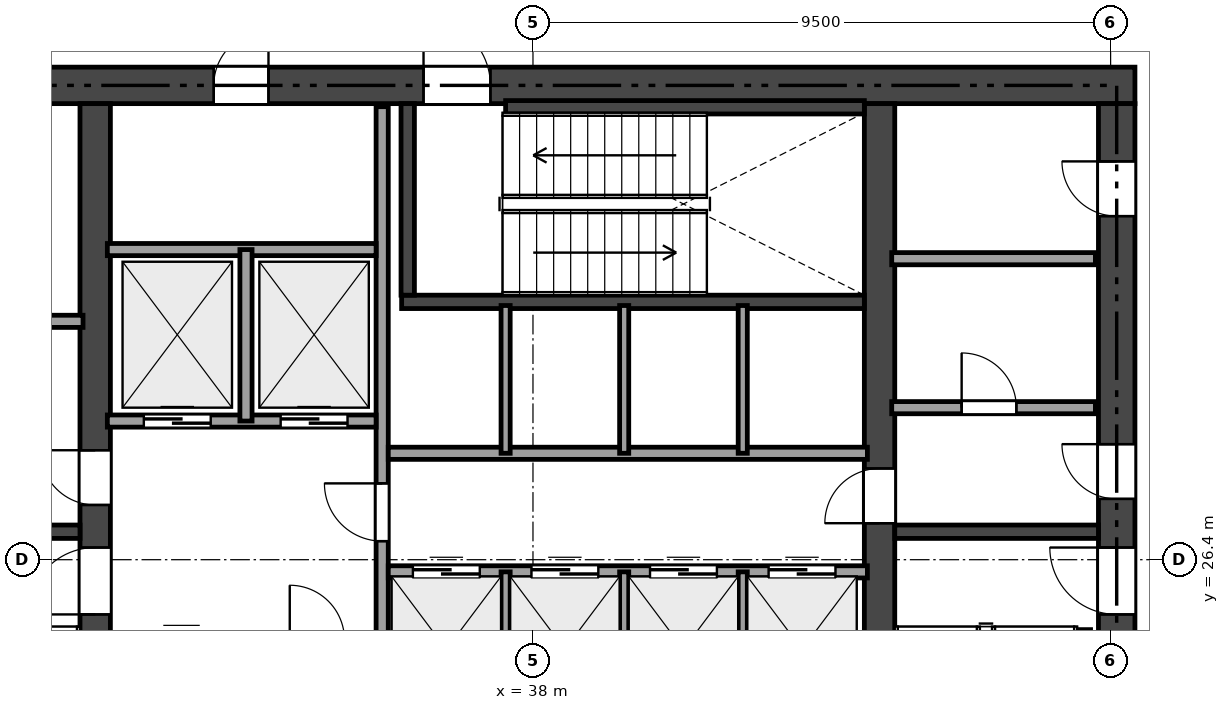
"""IFC4 building model, lengths in metres.
Left out: names, types, materials, properties, quantities, classifications, styles, units other than length and angle.
Written with IfcOpenShell. Run it as: python <this file> out.ifc"""

import sys

from ifc_helpers import new_model, si_unit, direction, frame, frame_2d, origin, place, context, subcontext, project, spatial, rectangle, extrude, element, fill, save


model = new_model("IFC4")
c1 = context("Model", 3, precision=1e-05, world=origin(), true_north=direction((0.0, 1.0)))
c2 = subcontext(c1, "Body", "Model", "MODEL_VIEW")
j1 = project(units=[si_unit("LENGTHUNIT", "METRE"), si_unit("PLANEANGLEUNIT", "RADIAN")], contexts=[c1])
p1 = place(None, origin())
s1 = spatial("IfcSite", under=j1, at=p1, CompositionType="ELEMENT")
p2 = place(p1, origin())
s2 = spatial("IfcBuilding", under=s1, at=p2, CompositionType="ELEMENT")
p3 = place(p2, frame((0.0, 0.0, 172.5)))
s3 = spatial("IfcBuildingStorey", under=s2, at=p3, CompositionType="ELEMENT", Elevation=172.5)
p4 = place(p3, frame((26.5, 34.2, 0.0), z_axis=(0.0, 0.0, 1.0), x_axis=(1.0, 0.0, 0.0)))
e1 = element("IfcWall", 1, at=p4, inside=s3, PredefinedType="SHEAR", context=c2, shape_type="SweptSolid", body=[
    extrude(rectangle(XDim=21.4, YDim=0.6, at=frame_2d((10.7, 0.0))), origin(), (0.0, 0.0, 1.0), 4.08),
])
p5 = place(p4, frame((9.7, 0.0, 0.0)))
e2 = element("IfcOpeningElement", 2, at=p5, cuts=e1, PredefinedType="OPENING", context=c2, shape_type="SweptSolid", body=[
    extrude(rectangle(XDim=1.1, YDim=2.15, at=frame_2d((0.55, 1.075))), frame((0.0, 0.31, 0.0), z_axis=(0.0, -1.0, 0.0), x_axis=(1.0, 0.0, 0.0)), (0.0, 0.0, 1.0), 0.62),
])
p6 = place(p4, frame((1.95, 0.0, 0.0)))
e3 = element("IfcOpeningElement", 3, at=p6, cuts=e1, PredefinedType="OPENING", context=c2, shape_type="SweptSolid", body=[
    extrude(rectangle(XDim=0.9, YDim=2.1, at=frame_2d((0.45, 1.05))), frame((0.0, 0.31, 0.0), z_axis=(0.0, -1.0, 0.0), x_axis=(1.0, 0.0, 0.0)), (0.0, 0.0, 1.0), 0.62),
])
p7 = place(p4, frame((6.25, 0.0, 0.0)))
e4 = element("IfcOpeningElement", 4, at=p7, cuts=e1, PredefinedType="OPENING", context=c2, shape_type="SweptSolid", body=[
    extrude(rectangle(XDim=0.9, YDim=2.1, at=frame_2d((0.45, 1.05))), frame((0.0, 0.31, 0.0), z_axis=(0.0, -1.0, 0.0), x_axis=(1.0, 0.0, 0.0)), (0.0, 0.0, 1.0), 0.62),
])
p8 = place(p3, frame((47.6, 18.9, 0.0), z_axis=(0.0, 0.0, 1.0), x_axis=(0.0, 1.0, 0.0)))
e5 = element("IfcWall", 5, at=p8, inside=s3, PredefinedType="SHEAR", context=c2, shape_type="SweptSolid", body=[
    extrude(rectangle(XDim=15.0, YDim=0.6, at=frame_2d((7.5, 0.0))), origin(), (0.0, 0.0, 1.0), 4.08),
])
p9 = place(p8, frame((6.6, 0.0, 0.0)))
e6 = element("IfcOpeningElement", 6, at=p9, cuts=e5, PredefinedType="OPENING", context=c2, shape_type="SweptSolid", body=[
    extrude(rectangle(XDim=1.1, YDim=2.15, at=frame_2d((0.55, 1.075))), frame((0.0, 0.31, 0.0), z_axis=(0.0, -1.0, 0.0), x_axis=(1.0, 0.0, 0.0)), (0.0, 0.0, 1.0), 0.62),
])
p10 = place(p8, frame((8.5, 0.0, 0.0)))
e7 = element("IfcOpeningElement", 7, at=p10, cuts=e5, PredefinedType="OPENING", context=c2, shape_type="SweptSolid", body=[
    extrude(rectangle(XDim=0.9, YDim=2.1, at=frame_2d((0.45, 1.05))), frame((0.0, 0.31, 0.0), z_axis=(0.0, -1.0, 0.0), x_axis=(1.0, 0.0, 0.0)), (0.0, 0.0, 1.0), 0.62),
])
p11 = place(p8, frame((13.15, 0.0, 0.0)))
e8 = element("IfcOpeningElement", 8, at=p11, cuts=e5, PredefinedType="OPENING", context=c2, shape_type="SweptSolid", body=[
    extrude(rectangle(XDim=0.9, YDim=2.1, at=frame_2d((0.45, 1.05))), frame((0.0, 0.31, 0.0), z_axis=(0.0, -1.0, 0.0), x_axis=(1.0, 0.0, 0.0)), (0.0, 0.0, 1.0), 0.62),
])
p12 = place(p3, frame((30.8, 18.9, 0.0), z_axis=(0.0, 0.0, 1.0), x_axis=(0.0, 1.0, 0.0)))
e9 = element("IfcWall", 9, at=p12, inside=s3, PredefinedType="SHEAR", context=c2, shape_type="SweptSolid", body=[
    extrude(rectangle(XDim=15.0, YDim=0.5, at=frame_2d((7.5, 0.0))), origin(), (0.0, 0.0, 1.0), 4.08),
])
p13 = place(p12, frame((6.6, 0.0, 0.0)))
e10 = element("IfcOpeningElement", 10, at=p13, cuts=e9, PredefinedType="OPENING", context=c2, shape_type="SweptSolid", body=[
    extrude(rectangle(XDim=1.1, YDim=2.15, at=frame_2d((0.55, 1.075))), frame((0.0, 0.26, 0.0), z_axis=(0.0, -1.0, 0.0), x_axis=(1.0, 0.0, 0.0)), (0.0, 0.0, 1.0), 0.52),
])
p14 = place(p12, frame((8.4, 0.0, 0.0)))
e11 = element("IfcOpeningElement", 11, at=p14, cuts=e9, PredefinedType="OPENING", context=c2, shape_type="SweptSolid", body=[
    extrude(rectangle(XDim=0.9, YDim=2.1, at=frame_2d((0.45, 1.05))), frame((0.0, 0.26, 0.0), z_axis=(0.0, -1.0, 0.0), x_axis=(1.0, 0.0, 0.0)), (0.0, 0.0, 1.0), 0.52),
])
p15 = place(p3, frame((43.7, 18.9, 0.0), z_axis=(0.0, 0.0, 1.0), x_axis=(0.0, 1.0, 0.0)))
e12 = element("IfcWall", 12, at=p15, inside=s3, PredefinedType="SHEAR", context=c2, shape_type="SweptSolid", body=[
    extrude(rectangle(XDim=15.0, YDim=0.5, at=frame_2d((7.5, 0.0))), origin(), (0.0, 0.0, 1.0), 4.08),
])
p16 = place(p15, frame((8.1, 0.0, 0.0)))
e13 = element("IfcOpeningElement", 13, at=p16, cuts=e12, PredefinedType="OPENING", context=c2, shape_type="SweptSolid", body=[
    extrude(rectangle(XDim=0.9, YDim=2.1, at=frame_2d((0.45, 1.05))), frame((0.0, 0.26, 0.0), z_axis=(0.0, -1.0, 0.0), x_axis=(1.0, 0.0, 0.0)), (0.0, 0.0, 1.0), 0.52),
])
p17 = place(p3, frame((27.1, 26.86, 0.0), z_axis=(0.0, 0.0, 1.0), x_axis=(1.0, 0.0, 0.0)))
e14 = element("IfcWall", 14, at=p17, inside=s3, PredefinedType="SHEAR", context=c2, shape_type="SweptSolid", body=[
    extrude(rectangle(XDim=3.45, YDim=0.22, at=frame_2d((1.725, 0.0))), origin(), (0.0, 0.0, 1.0), 4.08),
])
p18 = place(p3, frame((43.95, 26.86, 0.0), z_axis=(0.0, 0.0, 1.0), x_axis=(1.0, 0.0, 0.0)))
e15 = element("IfcWall", 15, at=p18, inside=s3, PredefinedType="SHEAR", context=c2, shape_type="SweptSolid", body=[
    extrude(rectangle(XDim=3.35, YDim=0.22, at=frame_2d((1.675, 0.0))), origin(), (0.0, 0.0, 1.0), 4.08),
])
p19 = place(p3, frame((35.84, 30.64, 0.0), z_axis=(0.0, 0.0, 1.0), x_axis=(1.0, 0.0, 0.0)))
e16 = element("IfcWall", 16, at=p19, inside=s3, PredefinedType="SHEAR", context=c2, shape_type="SweptSolid", body=[
    extrude(rectangle(XDim=7.61, YDim=0.22, at=frame_2d((3.805, 0.0))), origin(), (0.0, 0.0, 1.0), 4.08),
])
p20 = place(p3, frame((35.94, 30.75, 0.0), z_axis=(0.0, 0.0, 1.0), x_axis=(0.0, 1.0, 0.0)))
e17 = element("IfcWall", 17, at=p20, inside=s3, PredefinedType="SHEAR", context=c2, shape_type="SweptSolid", body=[
    extrude(rectangle(XDim=3.15, YDim=0.22, at=frame_2d((1.575, 0.0))), origin(), (0.0, 0.0, 1.0), 4.08),
])
p21 = place(p3, frame((37.55, 33.84, 0.0), z_axis=(0.0, 0.0, 1.0), x_axis=(1.0, 0.0, 0.0)))
e18 = element("IfcWall", 18, at=p21, inside=s3, PredefinedType="SHEAR", context=c2, shape_type="SweptSolid", body=[
    extrude(rectangle(XDim=5.9, YDim=0.22, at=frame_2d((2.95, 0.0))), origin(), (0.0, 0.0, 1.0), 4.08),
])
p22 = place(p3, frame((27.15, 30.32, 0.0), z_axis=(0.0, 0.0, 1.0), x_axis=(1.0, 0.0, 0.0)))
e19 = element("IfcWall", 19, at=p22, inside=s3, PredefinedType="SOLIDWALL", context=c2, shape_type="SweptSolid", body=[
    extrude(rectangle(XDim=3.45, YDim=0.2, at=frame_2d((1.725, 0.0))), origin(), (0.0, 0.0, 1.0), 4.08),
])
p23 = place(p3, frame((43.9, 28.9, 0.0), z_axis=(0.0, 0.0, 1.0), x_axis=(1.0, 0.0, 0.0)))
e20 = element("IfcWall", 20, at=p23, inside=s3, PredefinedType="SOLIDWALL", context=c2, shape_type="SweptSolid", body=[
    extrude(rectangle(XDim=3.35, YDim=0.2, at=frame_2d((1.675, 0.0))), origin(), (0.0, 0.0, 1.0), 4.08),
])
p24 = place(p23, frame((1.15, 0.0, 0.0)))
e21 = element("IfcOpeningElement", 21, at=p24, cuts=e20, PredefinedType="OPENING", context=c2, shape_type="SweptSolid", body=[
    extrude(rectangle(XDim=0.9, YDim=2.1, at=frame_2d((0.45, 1.05))), frame((0.0, 0.11, 0.0), z_axis=(0.0, -1.0, 0.0), x_axis=(1.0, 0.0, 0.0)), (0.0, 0.0, 1.0), 0.22),
])
p25 = place(p3, frame((43.9, 31.35, 0.0), z_axis=(0.0, 0.0, 1.0), x_axis=(1.0, 0.0, 0.0)))
e22 = element("IfcWall", 22, at=p25, inside=s3, PredefinedType="SOLIDWALL", context=c2, shape_type="SweptSolid", body=[
    extrude(rectangle(XDim=3.35, YDim=0.2, at=frame_2d((1.675, 0.0))), origin(), (0.0, 0.0, 1.0), 4.08),
])
p26 = place(p3, frame((35.52, 18.95, 0.0), z_axis=(0.0, 0.0, 1.0), x_axis=(0.0, 1.0, 0.0)))
e23 = element("IfcWall", 23, at=p26, inside=s3, PredefinedType="SOLIDWALL", context=c2, shape_type="SweptSolid", body=[
    extrude(rectangle(XDim=14.9, YDim=0.2, at=frame_2d((7.45, 0.0))), origin(), (0.0, 0.0, 1.0), 3.601),
])
p27 = place(p26, frame((7.755, 0.0, 0.0)))
e24 = element("IfcOpeningElement", 24, at=p27, cuts=e23, PredefinedType="OPENING", context=c2, shape_type="SweptSolid", body=[
    extrude(rectangle(XDim=0.95, YDim=2.15, at=frame_2d((0.475, 1.075))), frame((0.0, 0.11, 0.0), z_axis=(0.0, -1.0, 0.0), x_axis=(1.0, 0.0, 0.0)), (0.0, 0.0, 1.0), 0.22),
])
p28 = place(p26, frame((0.6, 0.0, 0.0)))
e25 = element("IfcOpeningElement", 25, at=p28, cuts=e23, PredefinedType="OPENING", context=c2, shape_type="SweptSolid", body=[
    extrude(rectangle(XDim=0.9, YDim=2.1, at=frame_2d((0.45, 1.05))), frame((0.0, 0.11, 0.0), z_axis=(0.0, -1.0, 0.0), x_axis=(1.0, 0.0, 0.0)), (0.0, 0.0, 1.0), 0.22),
])
p29 = place(p3, frame((31.0, 28.68, 0.0), z_axis=(0.0, 0.0, 1.0), x_axis=(1.0, 0.0, 0.0)))
e26 = element("IfcWall", 26, at=p29, inside=s3, PredefinedType="SOLIDWALL", context=c2, shape_type="SweptSolid", body=[
    extrude(rectangle(XDim=4.42, YDim=0.2, at=frame_2d((2.21, 0.0))), origin(), (0.0, 0.0, 1.0), 4.08),
])
p30 = place(p29, frame((0.6, 0.0, 0.0)))
e27 = element("IfcOpeningElement", 27, at=p30, cuts=e26, PredefinedType="OPENING", context=c2, shape_type="SweptSolid", body=[
    extrude(rectangle(XDim=1.1, YDim=2.15, at=frame_2d((0.55, 1.075))), frame((0.0, 0.11, 0.0), z_axis=(0.0, -1.0, 0.0), x_axis=(1.0, 0.0, 0.0)), (0.0, 0.0, 1.0), 0.22),
])
p31 = place(p29, frame((2.85, 0.0, 0.0)))
e28 = element("IfcOpeningElement", 28, at=p31, cuts=e26, PredefinedType="OPENING", context=c2, shape_type="SweptSolid", body=[
    extrude(rectangle(XDim=1.1, YDim=2.15, at=frame_2d((0.55, 1.075))), frame((0.0, 0.11, 0.0), z_axis=(0.0, -1.0, 0.0), x_axis=(1.0, 0.0, 0.0)), (0.0, 0.0, 1.0), 0.22),
])
p32 = place(p3, frame((31.0, 31.5, 0.0), z_axis=(0.0, 0.0, 1.0), x_axis=(1.0, 0.0, 0.0)))
e29 = element("IfcWall", 29, at=p32, inside=s3, PredefinedType="SOLIDWALL", context=c2, shape_type="SweptSolid", body=[
    extrude(rectangle(XDim=4.42, YDim=0.2, at=frame_2d((2.21, 0.0))), origin(), (0.0, 0.0, 1.0), 4.08),
])
p33 = place(p3, frame((33.28, 28.68, 0.0), z_axis=(0.0, 0.0, 1.0), x_axis=(0.0, 1.0, 0.0)))
e30 = element("IfcWall", 30, at=p33, inside=s3, PredefinedType="SOLIDWALL", context=c2, shape_type="SweptSolid", body=[
    extrude(rectangle(XDim=2.82, YDim=0.2, at=frame_2d((1.41, 0.0))), origin(), (0.0, 0.0, 1.0), 4.08),
])
p34 = place(p3, frame((35.62, 28.15, 0.0), z_axis=(0.0, 0.0, 1.0), x_axis=(1.0, 0.0, 0.0)))
e31 = element("IfcWall", 31, at=p34, inside=s3, PredefinedType="SOLIDWALL", context=c2, shape_type="SweptSolid", body=[
    extrude(rectangle(XDim=7.88, YDim=0.2, at=frame_2d((3.94, 0.0))), origin(), (0.0, 0.0, 1.0), 4.08),
])
p35 = place(p3, frame((35.62, 26.2, 0.0), z_axis=(0.0, 0.0, 1.0), x_axis=(1.0, 0.0, 0.0)))
e32 = element("IfcWall", 32, at=p35, inside=s3, PredefinedType="SOLIDWALL", context=c2, shape_type="SweptSolid", body=[
    extrude(rectangle(XDim=7.88, YDim=0.2, at=frame_2d((3.94, 0.0))), origin(), (0.0, 0.0, 1.0), 4.08),
])
p36 = place(p35, frame((0.405, 0.0, 0.0)))
e33 = element("IfcOpeningElement", 33, at=p36, cuts=e32, PredefinedType="OPENING", context=c2, shape_type="SweptSolid", body=[
    extrude(rectangle(XDim=1.1, YDim=2.15, at=frame_2d((0.55, 1.075))), frame((0.0, 0.11, 0.0), z_axis=(0.0, -1.0, 0.0), x_axis=(1.0, 0.0, 0.0)), (0.0, 0.0, 1.0), 0.22),
])
p37 = place(p35, frame((2.355, 0.0, 0.0)))
e34 = element("IfcOpeningElement", 34, at=p37, cuts=e32, PredefinedType="OPENING", context=c2, shape_type="SweptSolid", body=[
    extrude(rectangle(XDim=1.1, YDim=2.15, at=frame_2d((0.55, 1.075))), frame((0.0, 0.11, 0.0), z_axis=(0.0, -1.0, 0.0), x_axis=(1.0, 0.0, 0.0)), (0.0, 0.0, 1.0), 0.22),
])
p38 = place(p35, frame((4.305, 0.0, 0.0)))
e35 = element("IfcOpeningElement", 35, at=p38, cuts=e32, PredefinedType="OPENING", context=c2, shape_type="SweptSolid", body=[
    extrude(rectangle(XDim=1.1, YDim=2.15, at=frame_2d((0.55, 1.075))), frame((0.0, 0.11, 0.0), z_axis=(0.0, -1.0, 0.0), x_axis=(1.0, 0.0, 0.0)), (0.0, 0.0, 1.0), 0.22),
])
p39 = place(p35, frame((6.255, 0.0, 0.0)))
e36 = element("IfcOpeningElement", 36, at=p39, cuts=e32, PredefinedType="OPENING", context=c2, shape_type="SweptSolid", body=[
    extrude(rectangle(XDim=1.1, YDim=2.15, at=frame_2d((0.55, 1.075))), frame((0.0, 0.11, 0.0), z_axis=(0.0, -1.0, 0.0), x_axis=(1.0, 0.0, 0.0)), (0.0, 0.0, 1.0), 0.22),
])
for number, where, z_axis, x_axis in (
    (37, (37.55, 28.15, 0.0), (0.0, 0.0, 1.0), (0.0, 1.0, 0.0)),
    (38, (39.5, 28.15, 0.0), (0.0, 0.0, 1.0), (0.0, 1.0, 0.0)),
    (39, (41.45, 28.15, 0.0), (0.0, 0.0, 1.0), (0.0, 1.0, 0.0)),
):
    element("IfcWall", number, at=place(p3, frame(where, z_axis=z_axis, x_axis=x_axis)), inside=s3, PredefinedType="PARTITIONING", context=c2, shape_type="SweptSolid", body=[
        extrude(rectangle(XDim=2.43, YDim=0.15, at=frame_2d((1.215, 0.0))), origin(), (0.0, 0.0, 1.0), 4.08),
    ])
for number, where, z_axis, x_axis in (
    (40, (37.55, 23.65, 0.0), (0.0, 0.0, 1.0), (0.0, 1.0, 0.0)),
    (41, (39.5, 23.65, 0.0), (0.0, 0.0, 1.0), (0.0, 1.0, 0.0)),
    (42, (41.45, 23.65, 0.0), (0.0, 0.0, 1.0), (0.0, 1.0, 0.0)),
):
    element("IfcWall", number, at=place(p3, frame(where, z_axis=z_axis, x_axis=x_axis)), inside=s3, PredefinedType="PARTITIONING", context=c2, shape_type="SweptSolid", body=[
        extrude(rectangle(XDim=2.55, YDim=0.15, at=frame_2d((1.275, 0.0))), origin(), (0.0, 0.0, 1.0), 3.601),
    ])
p40 = place(p13, origin())
e43 = element("IfcDoor", 43, at=p40, inside=s3, OperationType="SINGLE_SWING_LEFT", PredefinedType="DOOR", context=c2, shape_type="SweptSolid", body=[
    extrude(rectangle(XDim=1.1, YDim=2.15, at=frame_2d((0.55, 1.075))), frame((0.0, 0.025, 0.0), z_axis=(0.0, -1.0, 0.0), x_axis=(1.0, 0.0, 0.0)), (0.0, 0.0, 1.0), 0.05),
])
fill(e10, e43)
p41 = place(p9, origin())
e44 = element("IfcDoor", 44, at=p41, inside=s3, OperationType="SINGLE_SWING_RIGHT", PredefinedType="DOOR", context=c2, shape_type="SweptSolid", body=[
    extrude(rectangle(XDim=1.1, YDim=2.15, at=frame_2d((0.55, 1.075))), frame((0.0, 0.025, 0.0), z_axis=(0.0, -1.0, 0.0), x_axis=(1.0, 0.0, 0.0)), (0.0, 0.0, 1.0), 0.05),
])
fill(e6, e44)
p42 = place(p5, origin())
e45 = element("IfcDoor", 45, at=p42, inside=s3, OperationType="SINGLE_SWING_LEFT", PredefinedType="DOOR", context=c2, shape_type="SweptSolid", body=[
    extrude(rectangle(XDim=1.1, YDim=2.15, at=frame_2d((0.55, 1.075))), frame((0.0, 0.025, 0.0), z_axis=(0.0, -1.0, 0.0), x_axis=(1.0, 0.0, 0.0)), (0.0, 0.0, 1.0), 0.05),
])
fill(e2, e45)
p43 = place(p27, origin())
e46 = element("IfcDoor", 46, at=p43, inside=s3, OperationType="SINGLE_SWING_RIGHT", PredefinedType="DOOR", context=c2, shape_type="SweptSolid", body=[
    extrude(rectangle(XDim=0.95, YDim=2.15, at=frame_2d((0.475, 1.075))), frame((0.0, 0.025, 0.0), z_axis=(0.0, -1.0, 0.0), x_axis=(1.0, 0.0, 0.0)), (0.0, 0.0, 1.0), 0.05),
])
fill(e24, e46)
p44 = place(p16, origin())
e47 = element("IfcDoor", 47, at=p44, inside=s3, OperationType="SINGLE_SWING_LEFT", PredefinedType="DOOR", context=c2, shape_type="SweptSolid", body=[
    extrude(rectangle(XDim=0.9, YDim=2.1, at=frame_2d((0.45, 1.05))), frame((0.0, 0.025, 0.0), z_axis=(0.0, -1.0, 0.0), x_axis=(1.0, 0.0, 0.0)), (0.0, 0.0, 1.0), 0.05),
])
fill(e13, e47)
p45 = place(p10, origin())
e48 = element("IfcDoor", 48, at=p45, inside=s3, OperationType="SINGLE_SWING_RIGHT", PredefinedType="DOOR", context=c2, shape_type="SweptSolid", body=[
    extrude(rectangle(XDim=0.9, YDim=2.1, at=frame_2d((0.45, 1.05))), frame((0.0, 0.025, 0.0), z_axis=(0.0, -1.0, 0.0), x_axis=(1.0, 0.0, 0.0)), (0.0, 0.0, 1.0), 0.05),
])
fill(e7, e48)
p46 = place(p14, origin())
e49 = element("IfcDoor", 49, at=p46, inside=s3, OperationType="SINGLE_SWING_RIGHT", PredefinedType="DOOR", context=c2, shape_type="SweptSolid", body=[
    extrude(rectangle(XDim=0.9, YDim=2.1, at=frame_2d((0.45, 1.05))), frame((0.0, 0.025, 0.0), z_axis=(0.0, -1.0, 0.0), x_axis=(1.0, 0.0, 0.0)), (0.0, 0.0, 1.0), 0.05),
])
fill(e11, e49)
p47 = place(p7, origin())
e50 = element("IfcDoor", 50, at=p47, inside=s3, OperationType="SINGLE_SWING_RIGHT", PredefinedType="DOOR", context=c2, shape_type="SweptSolid", body=[
    extrude(rectangle(XDim=0.9, YDim=2.1, at=frame_2d((0.45, 1.05))), frame((0.0, 0.025, 0.0), z_axis=(0.0, -1.0, 0.0), x_axis=(1.0, 0.0, 0.0)), (0.0, 0.0, 1.0), 0.05),
])
fill(e4, e50)
p48 = place(p24, origin())
e51 = element("IfcDoor", 51, at=p48, inside=s3, OperationType="SINGLE_SWING_LEFT", PredefinedType="DOOR", context=c2, shape_type="SweptSolid", body=[
    extrude(rectangle(XDim=0.9, YDim=2.1, at=frame_2d((0.45, 1.05))), frame((0.0, 0.025, 0.0), z_axis=(0.0, -1.0, 0.0), x_axis=(1.0, 0.0, 0.0)), (0.0, 0.0, 1.0), 0.05),
])
fill(e21, e51)
p49 = place(p11, origin())
e52 = element("IfcDoor", 52, at=p49, inside=s3, OperationType="SINGLE_SWING_RIGHT", PredefinedType="DOOR", context=c2, shape_type="SweptSolid", body=[
    extrude(rectangle(XDim=0.9, YDim=2.1, at=frame_2d((0.45, 1.05))), frame((0.0, 0.025, 0.0), z_axis=(0.0, -1.0, 0.0), x_axis=(1.0, 0.0, 0.0)), (0.0, 0.0, 1.0), 0.05),
])
fill(e8, e52)
p50 = place(p30, origin())
e53 = element("IfcDoor", 53, at=p50, inside=s3, OperationType="SLIDING_TO_LEFT", PredefinedType="DOOR", context=c2, shape_type="SweptSolid", body=[
    extrude(rectangle(XDim=1.1, YDim=2.15, at=frame_2d((0.55, 1.075))), frame((0.0, 0.025, 0.0), z_axis=(0.0, -1.0, 0.0), x_axis=(1.0, 0.0, 0.0)), (0.0, 0.0, 1.0), 0.05),
])
fill(e27, e53)
p51 = place(p31, origin())
e54 = element("IfcDoor", 54, at=p51, inside=s3, OperationType="SLIDING_TO_LEFT", PredefinedType="DOOR", context=c2, shape_type="SweptSolid", body=[
    extrude(rectangle(XDim=1.1, YDim=2.15, at=frame_2d((0.55, 1.075))), frame((0.0, 0.025, 0.0), z_axis=(0.0, -1.0, 0.0), x_axis=(1.0, 0.0, 0.0)), (0.0, 0.0, 1.0), 0.05),
])
fill(e28, e54)
p52 = place(p36, origin())
e55 = element("IfcDoor", 55, at=p52, inside=s3, OperationType="SLIDING_TO_LEFT", PredefinedType="DOOR", context=c2, shape_type="SweptSolid", body=[
    extrude(rectangle(XDim=1.1, YDim=2.15, at=frame_2d((0.55, 1.075))), frame((0.0, 0.025, 0.0), z_axis=(0.0, -1.0, 0.0), x_axis=(1.0, 0.0, 0.0)), (0.0, 0.0, 1.0), 0.05),
])
fill(e33, e55)
p53 = place(p37, origin())
e56 = element("IfcDoor", 56, at=p53, inside=s3, OperationType="SLIDING_TO_LEFT", PredefinedType="DOOR", context=c2, shape_type="SweptSolid", body=[
    extrude(rectangle(XDim=1.1, YDim=2.15, at=frame_2d((0.55, 1.075))), frame((0.0, 0.025, 0.0), z_axis=(0.0, -1.0, 0.0), x_axis=(1.0, 0.0, 0.0)), (0.0, 0.0, 1.0), 0.05),
])
fill(e34, e56)
p54 = place(p38, origin())
e57 = element("IfcDoor", 57, at=p54, inside=s3, OperationType="SLIDING_TO_LEFT", PredefinedType="DOOR", context=c2, shape_type="SweptSolid", body=[
    extrude(rectangle(XDim=1.1, YDim=2.15, at=frame_2d((0.55, 1.075))), frame((0.0, 0.025, 0.0), z_axis=(0.0, -1.0, 0.0), x_axis=(1.0, 0.0, 0.0)), (0.0, 0.0, 1.0), 0.05),
])
fill(e35, e57)
p55 = place(p39, origin())
e58 = element("IfcDoor", 58, at=p55, inside=s3, OperationType="SLIDING_TO_LEFT", PredefinedType="DOOR", context=c2, shape_type="SweptSolid", body=[
    extrude(rectangle(XDim=1.1, YDim=2.15, at=frame_2d((0.55, 1.075))), frame((0.0, 0.025, 0.0), z_axis=(0.0, -1.0, 0.0), x_axis=(1.0, 0.0, 0.0)), (0.0, 0.0, 1.0), 0.05),
])
fill(e36, e58)
save(model, sys.argv[1])
